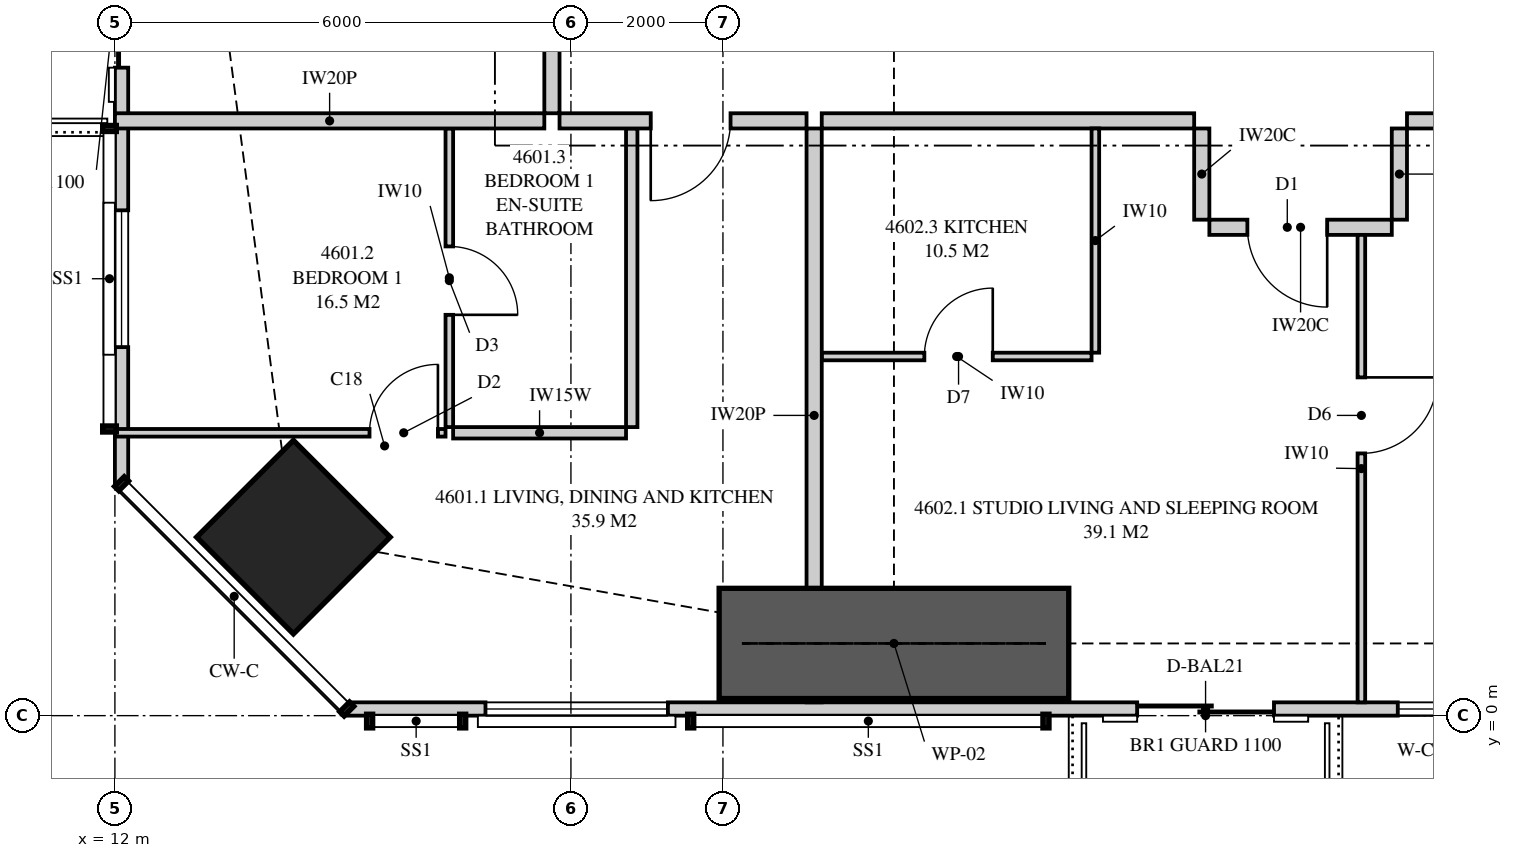
"""IFC4 building model, lengths in metres.
Left out: names, types, materials, properties, quantities, classifications, styles, units other than length and angle.
Written with IfcOpenShell. Run it as: python <this file> out.ifc"""

import sys

from ifc_helpers import new_model, si_unit, direction, frame, frame_2d, origin, origin_2d, place, context, subcontext, project, spatial, polyline, rectangle, outline, extrude, element, fill, save


model = new_model("IFC4")
c1 = context("Model", 3, precision=1e-05, world=origin(), true_north=direction((0.0, 1.0)))
c2 = subcontext(c1, "Body", "Model", "MODEL_VIEW")
j1 = project(units=[si_unit("LENGTHUNIT", "METRE"), si_unit("PLANEANGLEUNIT", "RADIAN")], contexts=[c1])
p1 = place(None, origin())
s1 = spatial("IfcSite", under=j1, at=p1, CompositionType="ELEMENT")
p2 = place(p1, origin())
s2 = spatial("IfcBuilding", under=s1, at=p2, CompositionType="ELEMENT")
p3 = place(p2, frame((0.0, 0.0, 171.1)))
s3 = spatial("IfcBuildingStorey", under=s2, at=p3, CompositionType="ELEMENT", Elevation=171.1)
p4 = place(p3, frame((14.348, 2.348, 0.0), z_axis=(0.0, 0.0, 1.0), x_axis=(0.707106781187, 0.707106781187, 0.0)))
e1 = element("IfcColumn", 1, at=p4, inside=s3, PredefinedType="COLUMN", context=c2, shape_type="SweptSolid", body=[
    extrude(rectangle(XDim=1.8, YDim=1.8, at=origin_2d()), origin(), (0.0, 0.0, 1.0), 3.35),
])
p5 = place(p3, frame((15.051, 0.087, 0.0), z_axis=(0.0, 0.0, 1.0), x_axis=(1.0, 0.0, 0.0)))
e2 = element("IfcWall", 2, at=p5, inside=s3, PredefinedType="SOLIDWALL", context=c2, shape_type="SweptSolid", body=[
    extrude(outline(polyline([(0.0, 0.0), (34.897, 0.0), (34.897, 3.11), (27.91, 3.11), (27.91, 2.15), (27.836, 2.15), (27.836, 3.11), (27.699, 3.11), (27.699, 2.15), (7.199, 2.15), (7.199, 3.11), (7.062, 3.11), (7.062, 2.15), (6.987, 2.15), (6.987, 3.11), (0.0, 3.11), (0.0, 0.0)])), frame((0.0, 0.087, 0.0), z_axis=(0.0, -1.0, 0.0), x_axis=(1.0, 0.0, 0.0)), (0.0, 0.0, 1.0), 0.175),
])
p6 = place(p5, frame((1.824, 0.0, 0.4)))
e3 = element("IfcOpeningElement", 3, at=p6, cuts=e2, PredefinedType="OPENING", context=c2, shape_type="SweptSolid", body=[
    extrude(rectangle(XDim=2.4, YDim=1.7, at=frame_2d((1.2, 0.85))), frame((0.0, 0.097, 0.0), z_axis=(0.0, -1.0, 0.0), x_axis=(1.0, 0.0, 0.0)), (0.0, 0.0, 1.0), 0.195),
])
p7 = place(p5, frame((10.399, 0.0, 0.0)))
e4 = element("IfcOpeningElement", 4, at=p7, cuts=e2, PredefinedType="OPENING", context=c2, shape_type="SweptSolid", body=[
    extrude(rectangle(XDim=1.8, YDim=2.1, at=frame_2d((0.9, 1.05))), frame((0.0, 0.097, 0.0), z_axis=(0.0, -1.0, 0.0), x_axis=(1.0, 0.0, 0.0)), (0.0, 0.0, 1.0), 0.195),
])
p8 = place(p5, frame((13.827, 0.0, 0.4)))
e5 = element("IfcOpeningElement", 5, at=p8, cuts=e2, PredefinedType="OPENING", context=c2, shape_type="SweptSolid", body=[
    extrude(rectangle(XDim=1.2, YDim=1.7, at=frame_2d((0.6, 0.85))), frame((0.0, 0.097, 0.0), z_axis=(0.0, -1.0, 0.0), x_axis=(1.0, 0.0, 0.0)), (0.0, 0.0, 1.0), 0.195),
])
p9 = place(p5, frame((22.799, 0.0, 0.0)))
e6 = element("IfcOpeningElement", 6, at=p9, cuts=e2, PredefinedType="OPENING", context=c2, shape_type="SweptSolid", body=[
    extrude(rectangle(XDim=1.8, YDim=2.1, at=frame_2d((0.9, 1.05))), frame((0.0, 0.097, 0.0), z_axis=(0.0, -1.0, 0.0), x_axis=(1.0, 0.0, 0.0)), (0.0, 0.0, 1.0), 0.195),
])
p10 = place(p5, frame((19.849, 0.0, 0.4)))
e7 = element("IfcOpeningElement", 7, at=p10, cuts=e2, PredefinedType="OPENING", context=c2, shape_type="SweptSolid", body=[
    extrude(rectangle(XDim=2.4, YDim=1.7, at=frame_2d((1.2, 0.85))), frame((0.0, 0.097, 0.0), z_axis=(0.0, -1.0, 0.0), x_axis=(1.0, 0.0, 0.0)), (0.0, 0.0, 1.0), 0.195),
])
p11 = place(p5, frame((30.108, 0.0, 0.4)))
e8 = element("IfcOpeningElement", 8, at=p11, cuts=e2, PredefinedType="OPENING", context=c2, shape_type="SweptSolid", body=[
    extrude(rectangle(XDim=2.4, YDim=1.7, at=frame_2d((1.2, 0.85))), frame((0.0, 0.097, 0.0), z_axis=(0.0, -1.0, 0.0), x_axis=(1.0, 0.0, 0.0)), (0.0, 0.0, 1.0), 0.195),
])
p12 = place(p3, frame((12.087, 32.949, 0.0), z_axis=(0.0, 0.0, 1.0), x_axis=(0.0, -1.0, 0.0)))
e9 = element("IfcWall", 9, at=p12, inside=s3, PredefinedType="SOLIDWALL", context=c2, shape_type="SweptSolid", body=[
    extrude(outline(polyline([(0.0, 0.0), (29.897, 0.0), (29.897, 3.11), (20.191, 3.11), (20.191, 2.15), (20.051, 2.15), (20.051, 3.11), (19.949, 3.11), (19.949, 2.15), (7.949, 2.15), (7.949, 3.11), (7.823, 3.11), (7.823, 2.15), (7.73, 2.15), (7.73, 3.11), (0.0, 3.11), (0.0, 0.0)])), frame((0.0, 0.087, 0.0), z_axis=(0.0, -1.0, 0.0), x_axis=(1.0, 0.0, 0.0)), (0.0, 0.0, 1.0), 0.175),
])
p13 = place(p12, frame((1.297, 0.0, 0.4)))
e10 = element("IfcOpeningElement", 10, at=p13, cuts=e9, PredefinedType="OPENING", context=c2, shape_type="SweptSolid", body=[
    extrude(rectangle(XDim=1.8, YDim=1.7, at=frame_2d((0.9, 0.85))), frame((0.0, 0.097, 0.0), z_axis=(0.0, -1.0, 0.0), x_axis=(1.0, 0.0, 0.0)), (0.0, 0.0, 1.0), 0.195),
])
p14 = place(p12, frame((4.349, 0.0, 0.4)))
e11 = element("IfcOpeningElement", 11, at=p14, cuts=e9, PredefinedType="OPENING", context=c2, shape_type="SweptSolid", body=[
    extrude(rectangle(XDim=1.2, YDim=1.7, at=frame_2d((0.6, 0.85))), frame((0.0, 0.097, 0.0), z_axis=(0.0, -1.0, 0.0), x_axis=(1.0, 0.0, 0.0)), (0.0, 0.0, 1.0), 0.195),
])
p15 = place(p12, frame((11.024, 0.0, 0.4)))
e12 = element("IfcOpeningElement", 12, at=p15, cuts=e9, PredefinedType="OPENING", context=c2, shape_type="SweptSolid", body=[
    extrude(rectangle(XDim=1.8, YDim=1.7, at=frame_2d((0.9, 0.85))), frame((0.0, 0.097, 0.0), z_axis=(0.0, -1.0, 0.0), x_axis=(1.0, 0.0, 0.0)), (0.0, 0.0, 1.0), 0.195),
])
p16 = place(p12, frame((15.044, 0.0, 0.4)))
e13 = element("IfcOpeningElement", 13, at=p16, cuts=e9, PredefinedType="OPENING", context=c2, shape_type="SweptSolid", body=[
    extrude(rectangle(XDim=2.4, YDim=1.7, at=frame_2d((1.2, 0.85))), frame((0.0, 0.097, 0.0), z_axis=(0.0, -1.0, 0.0), x_axis=(1.0, 0.0, 0.0)), (0.0, 0.0, 1.0), 0.195),
])
p17 = place(p12, frame((22.624, 0.0, 0.0)))
e14 = element("IfcOpeningElement", 14, at=p17, cuts=e9, PredefinedType="OPENING", context=c2, shape_type="SweptSolid", body=[
    extrude(rectangle(XDim=1.8, YDim=2.1, at=frame_2d((0.9, 1.05))), frame((0.0, 0.097, 0.0), z_axis=(0.0, -1.0, 0.0), x_axis=(1.0, 0.0, 0.0)), (0.0, 0.0, 1.0), 0.195),
])
p18 = place(p12, frame((26.301, 0.0, 0.4)))
e15 = element("IfcOpeningElement", 15, at=p18, cuts=e9, PredefinedType="OPENING", context=c2, shape_type="SweptSolid", body=[
    extrude(rectangle(XDim=1.8, YDim=1.7, at=frame_2d((0.9, 0.85))), frame((0.0, 0.097, 0.0), z_axis=(0.0, -1.0, 0.0), x_axis=(1.0, 0.0, 0.0)), (0.0, 0.0, 1.0), 0.195),
])
p19 = place(p3, frame((21.2, 0.175, 0.0), z_axis=(0.0, 0.0, 1.0), x_axis=(0.0, 1.0, 0.0)))
e16 = element("IfcWall", 16, at=p19, inside=s3, PredefinedType="PARTITIONING", context=c2, shape_type="SweptSolid", body=[
    extrude(outline(polyline([(0.037, 3.11), (0.0, 3.11), (0.0, 0.0), (0.529, 0.0), (0.529, 0.667), (1.021, 0.667), (1.021, 0.0), (7.55, 0.0), (7.55, 3.11), (1.885, 3.11), (1.885, 2.15), (1.021, 2.15), (1.021, 1.483), (0.529, 1.483), (0.529, 2.15), (0.037, 2.15), (0.037, 3.11)])), frame((0.0, 0.1, 0.0), z_axis=(0.0, -1.0, 0.0), x_axis=(1.0, 0.0, 0.0)), (0.0, 0.0, 1.0), 0.2),
])
p20 = place(p3, frame((17.85, 7.825, 0.0), z_axis=(0.0, 0.0, 1.0), x_axis=(1.0, 0.0, 0.0)))
e17 = element("IfcWall", 17, at=p20, inside=s3, PredefinedType="PARTITIONING", context=c2, shape_type="SweptSolid", body=[
    extrude(rectangle(XDim=3.25, YDim=0.2, at=frame_2d((1.625, 0.0))), origin(), (0.0, 0.0, 1.0), 3.11),
])
p21 = place(p20, frame((1.2, 0.0, 0.0)))
e18 = element("IfcOpeningElement", 18, at=p21, cuts=e17, PredefinedType="OPENING", context=c2, shape_type="SweptSolid", body=[
    extrude(rectangle(XDim=1.05, YDim=2.2, at=frame_2d((0.525, 1.1))), frame((0.0, 0.11, 0.0), z_axis=(0.0, -1.0, 0.0), x_axis=(1.0, 0.0, 0.0)), (0.0, 0.0, 1.0), 0.22),
])
p22 = place(p3, frame((16.4, 3.796, 0.0), z_axis=(0.0, 0.0, 1.0), x_axis=(0.0, 1.0, 0.0)))
e19 = element("IfcWall", 19, at=p22, inside=s3, PredefinedType="PARTITIONING", context=c2, shape_type="SweptSolid", body=[
    extrude(rectangle(XDim=3.929, YDim=0.1, at=frame_2d((1.964, 0.0))), origin(), (0.0, 0.0, 1.0), 3.11),
])
p23 = place(p22, frame((1.477, 0.0, 0.0)))
e20 = element("IfcOpeningElement", 20, at=p23, cuts=e19, PredefinedType="OPENING", context=c2, shape_type="SweptSolid", body=[
    extrude(rectangle(XDim=0.9, YDim=2.1, at=frame_2d((0.45, 1.05))), frame((0.0, 0.06, 0.0), z_axis=(0.0, -1.0, 0.0), x_axis=(1.0, 0.0, 0.0)), (0.0, 0.0, 1.0), 0.12),
])
p24 = place(p3, frame((16.35, 3.721, 0.0), z_axis=(0.0, 0.0, 1.0), x_axis=(-1.0, 0.0, 0.0)))
e21 = element("IfcWall", 21, at=p24, inside=s3, PredefinedType="PARTITIONING", context=c2, shape_type="SweptSolid", body=[
    extrude(outline(polyline([(0.0, 0.0), (4.35, 0.0), (4.35, 3.11), (3.049, 3.11), (3.049, 2.15), (1.314, 2.15), (1.314, 3.11), (0.0, 3.11), (0.0, 0.0)])), frame((0.0, 0.05, 0.0), z_axis=(0.0, -1.0, 0.0), x_axis=(1.0, 0.0, 0.0)), (0.0, 0.0, 1.0), 0.1),
])
p25 = place(p24, frame((0.1, 0.0, 0.0)))
e22 = element("IfcOpeningElement", 22, at=p25, cuts=e21, PredefinedType="OPENING", context=c2, shape_type="SweptSolid", body=[
    extrude(rectangle(XDim=0.9, YDim=2.1, at=frame_2d((0.45, 1.05))), frame((0.0, 0.06, 0.0), z_axis=(0.0, -1.0, 0.0), x_axis=(1.0, 0.0, 0.0)), (0.0, 0.0, 1.0), 0.12),
])
p26 = place(p3, frame((18.725, 3.721, 0.0), z_axis=(0.0, 0.0, 1.0), x_axis=(-1.0, 0.0, 0.0)))
e23 = element("IfcWall", 23, at=p26, inside=s3, PredefinedType="PLUMBINGWALL", context=c2, shape_type="SweptSolid", body=[
    extrude(rectangle(XDim=2.275, YDim=0.15, at=frame_2d((1.138, 0.0))), origin(), (0.0, 0.0, 1.0), 3.11),
])
p27 = place(p3, frame((18.8, 3.796, 0.0), z_axis=(0.0, 0.0, 1.0), x_axis=(0.0, 1.0, 0.0)))
e24 = element("IfcWall", 24, at=p27, inside=s3, PredefinedType="PLUMBINGWALL", context=c2, shape_type="SweptSolid", body=[
    extrude(rectangle(XDim=3.929, YDim=0.15, at=frame_2d((1.964, 0.0))), origin(), (0.0, 0.0, 1.0), 3.11),
])
p28 = place(p3, frame((21.3, 7.825, 0.0), z_axis=(0.0, 0.0, 1.0), x_axis=(1.0, 0.0, 0.0)))
e25 = element("IfcWall", 25, at=p28, inside=s3, PredefinedType="PARTITIONING", context=c2, shape_type="SweptSolid", body=[
    extrude(outline(polyline([(0.0, 0.0), (4.9, 0.0), (4.9, 3.11), (1.287, 3.11), (1.287, 2.541), (0.613, 2.541), (0.613, 3.11), (0.0, 3.11), (0.0, 0.0)])), frame((0.0, 0.1, 0.0), z_axis=(0.0, -1.0, 0.0), x_axis=(1.0, 0.0, 0.0)), (0.0, 0.0, 1.0), 0.2),
])
p29 = place(p3, frame((21.3, 4.725, 0.0), z_axis=(0.0, 0.0, 1.0), x_axis=(1.0, 0.0, 0.0)))
e26 = element("IfcWall", 26, at=p29, inside=s3, PredefinedType="PARTITIONING", context=c2, shape_type="SweptSolid", body=[
    extrude(outline(polyline([(0.0, 0.0), (3.55, 0.0), (3.55, 3.11), (1.237, 3.11), (1.237, 2.541), (0.663, 2.541), (0.663, 3.11), (0.0, 3.11), (0.0, 0.0)])), frame((0.0, 0.05, 0.0), z_axis=(0.0, -1.0, 0.0), x_axis=(1.0, 0.0, 0.0)), (0.0, 0.0, 1.0), 0.1),
])
p30 = place(p29, frame((1.35, 0.0, 0.0)))
e27 = element("IfcOpeningElement", 27, at=p30, cuts=e26, PredefinedType="OPENING", context=c2, shape_type="SweptSolid", body=[
    extrude(rectangle(XDim=0.9, YDim=2.1, at=frame_2d((0.45, 1.05))), frame((0.0, 0.06, 0.0), z_axis=(0.0, -1.0, 0.0), x_axis=(1.0, 0.0, 0.0)), (0.0, 0.0, 1.0), 0.12),
])
p31 = place(p3, frame((24.9, 4.775, 0.0), z_axis=(0.0, 0.0, 1.0), x_axis=(0.0, 1.0, 0.0)))
e28 = element("IfcWall", 28, at=p31, inside=s3, PredefinedType="PARTITIONING", context=c2, shape_type="SweptSolid", body=[
    extrude(rectangle(XDim=2.95, YDim=0.1, at=frame_2d((1.475, 0.0))), origin(), (0.0, 0.0, 1.0), 3.11),
])
p32 = place(p3, frame((28.4, 0.175, 0.0), z_axis=(0.0, 0.0, 1.0), x_axis=(0.0, 1.0, 0.0)))
e29 = element("IfcWall", 29, at=p32, inside=s3, PredefinedType="PARTITIONING", context=c2, shape_type="SweptSolid", body=[
    extrude(outline(polyline([(0.0, 0.0), (6.15, 0.0), (6.15, 3.11), (1.635, 3.11), (1.635, 2.15), (0.0, 2.15), (0.0, 3.11), (0.0, 0.0)])), frame((0.0, 0.05, 0.0), z_axis=(0.0, -1.0, 0.0), x_axis=(1.0, 0.0, 0.0)), (0.0, 0.0, 1.0), 0.1),
])
p33 = place(p32, frame((3.275, 0.0, 0.0)))
e30 = element("IfcOpeningElement", 30, at=p33, cuts=e29, PredefinedType="OPENING", context=c2, shape_type="SweptSolid", body=[
    extrude(rectangle(XDim=1.0, YDim=2.1, at=frame_2d((0.5, 1.05))), frame((0.0, 0.06, 0.0), z_axis=(0.0, -1.0, 0.0), x_axis=(1.0, 0.0, 0.0)), (0.0, 0.0, 1.0), 0.12),
])
p34 = place(p3, frame((12.0, 7.825, 0.0), z_axis=(0.0, 0.0, 1.0), x_axis=(1.0, 0.0, 0.0)))
e31 = element("IfcWall", 31, at=p34, inside=s3, PredefinedType="PARTITIONING", context=c2, shape_type="SweptSolid", body=[
    extrude(outline(polyline([(0.0, 0.0), (5.65, 0.0), (5.65, 3.11), (2.547, 3.11), (2.547, 2.15), (0.712, 2.15), (0.712, 3.11), (0.0, 3.11), (0.0, 0.0)])), frame((0.0, 0.1, 0.0), z_axis=(0.0, -1.0, 0.0), x_axis=(1.0, 0.0, 0.0)), (0.0, 0.0, 1.0), 0.2),
])
p35 = place(p3, frame((17.75, 7.925, 0.0), z_axis=(0.0, 0.0, 1.0), x_axis=(0.0, 1.0, 0.0)))
e32 = element("IfcWall", 32, at=p35, inside=s3, PredefinedType="PARTITIONING", context=c2, shape_type="SweptSolid", body=[
    extrude(outline(polyline([(0.0, 0.0), (14.875, 0.0), (14.875, 3.11), (5.412, 3.11), (5.412, 2.541), (4.738, 2.541), (4.738, 3.11), (0.0, 3.11), (0.0, 0.0)])), frame((0.0, 0.1, 0.0), z_axis=(0.0, -1.0, 0.0), x_axis=(1.0, 0.0, 0.0)), (0.0, 0.0, 1.0), 0.2),
])
p36 = place(p35, frame((6.938, 0.0, 0.0)))
e33 = element("IfcOpeningElement", 33, at=p36, cuts=e32, PredefinedType="OPENING", context=c2, shape_type="SweptSolid", body=[
    extrude(rectangle(XDim=1.05, YDim=2.2, at=frame_2d((0.525, 1.1))), frame((0.0, 0.11, 0.0), z_axis=(0.0, -1.0, 0.0), x_axis=(1.0, 0.0, 0.0)), (0.0, 0.0, 1.0), 0.22),
])
p37 = place(p3, frame((29.0, 7.825, 0.0), z_axis=(0.0, 0.0, 1.0), x_axis=(1.0, 0.0, 0.0)))
e34 = element("IfcWall", 34, at=p37, inside=s3, PredefinedType="PARTITIONING", context=c2, shape_type="SweptSolid", body=[
    extrude(outline(polyline([(0.0, 0.0), (4.5, 0.0), (4.5, 3.11), (3.837, 3.11), (3.837, 2.541), (3.163, 2.541), (3.163, 3.11), (0.0, 3.11), (0.0, 0.0)])), frame((0.0, 0.1, 0.0), z_axis=(0.0, -1.0, 0.0), x_axis=(1.0, 0.0, 0.0)), (0.0, 0.0, 1.0), 0.2),
])
p38 = place(p3, frame((26.4, 6.425, 0.0), z_axis=(0.0, 0.0, 1.0), x_axis=(1.0, 0.0, 0.0)))
e35 = element("IfcWall", 35, at=p38, inside=s3, PredefinedType="PARTITIONING", context=c2, shape_type="SweptSolid", body=[
    extrude(rectangle(XDim=2.4, YDim=0.2, at=frame_2d((1.2, 0.0))), origin(), (0.0, 0.0, 1.0), 3.11),
])
p39 = place(p38, frame((0.5, 0.0, 0.0)))
e36 = element("IfcOpeningElement", 36, at=p39, cuts=e35, PredefinedType="OPENING", context=c2, shape_type="SweptSolid", body=[
    extrude(rectangle(XDim=1.05, YDim=2.2, at=frame_2d((0.525, 1.1))), frame((0.0, 0.11, 0.0), z_axis=(0.0, -1.0, 0.0), x_axis=(1.0, 0.0, 0.0)), (0.0, 0.0, 1.0), 0.22),
])
for number, where, z_axis, x_axis in (
    (37, (26.3, 7.725, 0.0), (0.0, 0.0, 1.0), (0.0, -1.0, 0.0)),
    (38, (28.9, 7.725, 0.0), (0.0, 0.0, 1.0), (0.0, -1.0, 0.0)),
):
    element("IfcWall", number, at=place(p3, frame(where, z_axis=z_axis, x_axis=x_axis)), inside=s3, PredefinedType="PARTITIONING", context=c2, shape_type="SweptSolid", body=[
        extrude(rectangle(XDim=1.2, YDim=0.2, at=frame_2d((0.6, 0.0))), origin(), (0.0, 0.0, 1.0), 3.11),
    ])
p40 = place(p3, frame((19.95, 0.95, 0.0), z_axis=(0.0, 0.0, 1.0), x_axis=(1.0, 0.0, 0.0)))
e39 = element("IfcWall", 39, at=p40, inside=s3, PredefinedType="SHEAR", context=c2, shape_type="SweptSolid", body=[
    extrude(rectangle(XDim=4.6, YDim=1.45, at=frame_2d((2.3, 0.0))), origin(), (0.0, 0.0, 1.0), 3.35),
])
p41 = place(p6, origin())
e40 = element("IfcWindow", 40, at=p41, inside=s3, PartitioningType="SINGLE_PANEL", PredefinedType="WINDOW", context=c2, shape_type="SweptSolid", body=[
    extrude(rectangle(XDim=2.4, YDim=1.7, at=frame_2d((1.2, 0.85))), frame((0.0, 0.03, 0.0), z_axis=(0.0, -1.0, 0.0), x_axis=(1.0, 0.0, 0.0)), (0.0, 0.0, 1.0), 0.06),
])
fill(e3, e40)
p42 = place(p7, origin())
e41 = element("IfcDoor", 41, at=p42, inside=s3, OperationType="SLIDING_TO_LEFT", PredefinedType="DOOR", context=c2, shape_type="SweptSolid", body=[
    extrude(rectangle(XDim=1.8, YDim=2.1, at=frame_2d((0.9, 1.05))), frame((0.0, 0.025, 0.0), z_axis=(0.0, -1.0, 0.0), x_axis=(1.0, 0.0, 0.0)), (0.0, 0.0, 1.0), 0.05),
])
fill(e4, e41)
p43 = place(p8, origin())
e42 = element("IfcWindow", 42, at=p43, inside=s3, PartitioningType="SINGLE_PANEL", PredefinedType="WINDOW", context=c2, shape_type="SweptSolid", body=[
    extrude(rectangle(XDim=1.2, YDim=1.7, at=frame_2d((0.6, 0.85))), frame((0.0, 0.03, 0.0), z_axis=(0.0, -1.0, 0.0), x_axis=(1.0, 0.0, 0.0)), (0.0, 0.0, 1.0), 0.06),
])
fill(e5, e42)
p44 = place(p17, origin())
e43 = element("IfcDoor", 43, at=p44, inside=s3, OperationType="SLIDING_TO_LEFT", PredefinedType="DOOR", context=c2, shape_type="SweptSolid", body=[
    extrude(rectangle(XDim=1.8, YDim=2.1, at=frame_2d((0.9, 1.05))), frame((0.0, 0.025, 0.0), z_axis=(0.0, -1.0, 0.0), x_axis=(1.0, 0.0, 0.0)), (0.0, 0.0, 1.0), 0.05),
])
fill(e14, e43)
p45 = place(p18, origin())
e44 = element("IfcWindow", 44, at=p45, inside=s3, PartitioningType="SINGLE_PANEL", PredefinedType="WINDOW", context=c2, shape_type="SweptSolid", body=[
    extrude(rectangle(XDim=1.8, YDim=1.7, at=frame_2d((0.9, 0.85))), frame((0.0, 0.03, 0.0), z_axis=(0.0, -1.0, 0.0), x_axis=(1.0, 0.0, 0.0)), (0.0, 0.0, 1.0), 0.06),
])
fill(e15, e44)
p46 = place(p21, frame((1.05, 0.0, 0.0), z_axis=(0.0, 0.0, 1.0), x_axis=(-1.0, 0.0, 0.0)))
e45 = element("IfcDoor", 45, at=p46, inside=s3, OperationType="SINGLE_SWING_RIGHT", PredefinedType="DOOR", context=c2, shape_type="SweptSolid", body=[
    extrude(rectangle(XDim=1.05, YDim=2.2, at=frame_2d((0.525, 1.1))), frame((0.0, 0.025, 0.0), z_axis=(0.0, -1.0, 0.0), x_axis=(1.0, 0.0, 0.0)), (0.0, 0.0, 1.0), 0.05),
])
fill(e18, e45)
p47 = place(p25, frame((0.9, 0.0, 0.0), z_axis=(0.0, 0.0, 1.0), x_axis=(-1.0, 0.0, 0.0)))
e46 = element("IfcDoor", 46, at=p47, inside=s3, OperationType="SINGLE_SWING_RIGHT", PredefinedType="DOOR", context=c2, shape_type="SweptSolid", body=[
    extrude(rectangle(XDim=0.9, YDim=2.1, at=frame_2d((0.45, 1.05))), frame((0.0, 0.025, 0.0), z_axis=(0.0, -1.0, 0.0), x_axis=(1.0, 0.0, 0.0)), (0.0, 0.0, 1.0), 0.05),
])
fill(e22, e46)
p48 = place(p23, frame((0.9, 0.0, 0.0), z_axis=(0.0, 0.0, 1.0), x_axis=(-1.0, 0.0, 0.0)))
e47 = element("IfcDoor", 47, at=p48, inside=s3, OperationType="SINGLE_SWING_RIGHT", PredefinedType="DOOR", context=c2, shape_type="SweptSolid", body=[
    extrude(rectangle(XDim=0.9, YDim=2.1, at=frame_2d((0.45, 1.05))), frame((0.0, 0.025, 0.0), z_axis=(0.0, -1.0, 0.0), x_axis=(1.0, 0.0, 0.0)), (0.0, 0.0, 1.0), 0.05),
])
fill(e20, e47)
p49 = place(p39, frame((1.05, 0.0, 0.0), z_axis=(0.0, 0.0, 1.0), x_axis=(-1.0, 0.0, 0.0)))
e48 = element("IfcDoor", 48, at=p49, inside=s3, OperationType="SINGLE_SWING_LEFT", PredefinedType="DOOR", context=c2, shape_type="SweptSolid", body=[
    extrude(rectangle(XDim=1.05, YDim=2.2, at=frame_2d((0.525, 1.1))), frame((0.0, 0.025, 0.0), z_axis=(0.0, -1.0, 0.0), x_axis=(1.0, 0.0, 0.0)), (0.0, 0.0, 1.0), 0.05),
])
fill(e36, e48)
p50 = place(p30, origin())
e49 = element("IfcDoor", 49, at=p50, inside=s3, OperationType="SINGLE_SWING_RIGHT", PredefinedType="DOOR", context=c2, shape_type="SweptSolid", body=[
    extrude(rectangle(XDim=0.9, YDim=2.1, at=frame_2d((0.45, 1.05))), frame((0.0, 0.025, 0.0), z_axis=(0.0, -1.0, 0.0), x_axis=(1.0, 0.0, 0.0)), (0.0, 0.0, 1.0), 0.05),
])
fill(e27, e49)
p51 = place(p33, frame((1.0, 0.0, 0.0), z_axis=(0.0, 0.0, 1.0), x_axis=(-1.0, 0.0, 0.0)))
e50 = element("IfcDoor", 50, at=p51, inside=s3, OperationType="SINGLE_SWING_LEFT", PredefinedType="DOOR", context=c2, shape_type="SweptSolid", body=[
    extrude(rectangle(XDim=1.0, YDim=2.1, at=frame_2d((0.5, 1.05))), frame((0.0, 0.025, 0.0), z_axis=(0.0, -1.0, 0.0), x_axis=(1.0, 0.0, 0.0)), (0.0, 0.0, 1.0), 0.05),
])
fill(e30, e50)
save(model, sys.argv[1])
